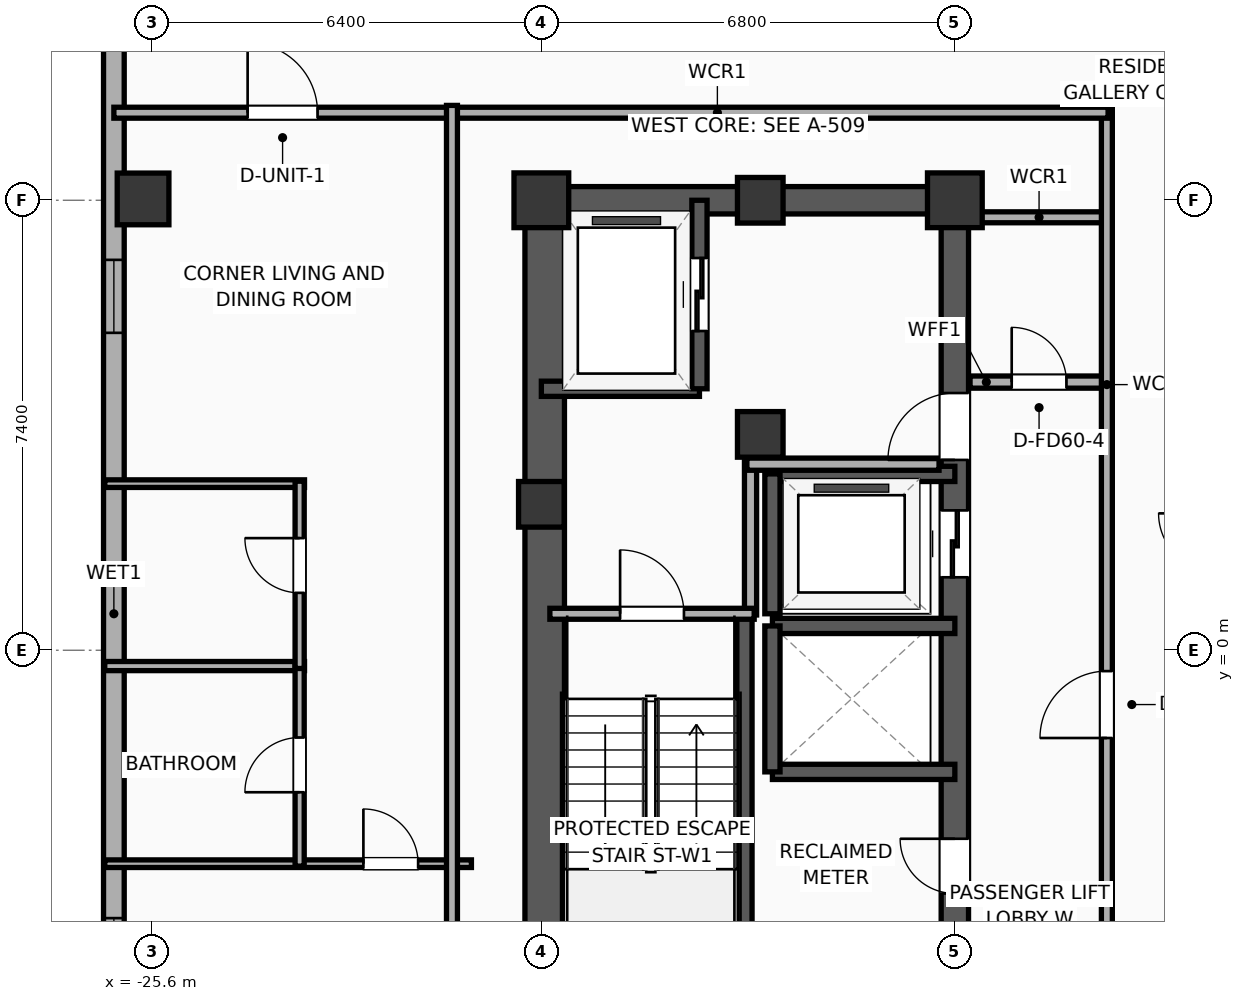
"""IFC4 building model, lengths in metres.
Left out: names, types, materials, properties, quantities, classifications, styles, units other than length and angle.
Written with IfcOpenShell. Run it as: python <this file> out.ifc"""

import sys

from ifc_helpers import new_model, si_unit, direction, frame, frame_2d, origin, origin_2d, place, context, subcontext, project, spatial, rectangle, hollow_rectangle, extrude, element, fill, save


model = new_model("IFC4")
c1 = context("Model", 3, precision=1e-05, world=origin(), true_north=direction((0.0, 1.0)))
c2 = subcontext(c1, "Body", "Model", "MODEL_VIEW")
j1 = project(units=[si_unit("LENGTHUNIT", "METRE"), si_unit("PLANEANGLEUNIT", "RADIAN")], contexts=[c1])
p1 = place(None, origin())
s1 = spatial("IfcSite", under=j1, at=p1, CompositionType="ELEMENT")
p2 = place(p1, origin())
s2 = spatial("IfcBuilding", under=s1, at=p2, CompositionType="ELEMENT")
p3 = place(p2, frame((0.0, 0.0, 204.1)))
s3 = spatial("IfcBuildingStorey", under=s2, at=p3, CompositionType="ELEMENT", Elevation=204.1)
p4 = place(p3, frame((-19.2, 2.4, 0.0), z_axis=(0.0, 0.0, 1.0), x_axis=(1.0, 0.0, 0.0)))
e1 = element("IfcColumn", 1, at=p4, inside=s3, PredefinedType="COLUMN", context=c2, shape_type="SweptSolid", body=[
    extrude(rectangle(XDim=0.75, YDim=0.75, at=origin_2d()), origin(), (0.0, 0.0, 1.0), 3.9),
])
p5 = place(p3, frame((-19.2, 7.4, 0.0), z_axis=(0.0, 0.0, 1.0), x_axis=(1.0, 0.0, 0.0)))
e2 = element("IfcColumn", 2, at=p5, inside=s3, PredefinedType="COLUMN", context=c2, shape_type="SweptSolid", body=[
    extrude(rectangle(XDim=0.9, YDim=0.9, at=origin_2d()), origin(), (0.0, 0.0, 1.0), 3.9),
])
for number, where, z_axis, x_axis in (
    (3, (-15.6, 7.4, 0.0), (0.0, 0.0, 1.0), (1.0, 0.0, 0.0)),
    (4, (-15.6, 3.55, 0.0), (0.0, 0.0, 1.0), (1.0, 0.0, 0.0)),
):
    element("IfcColumn", number, at=place(p3, frame(where, z_axis=z_axis, x_axis=x_axis)), inside=s3, PredefinedType="COLUMN", context=c2, shape_type="SweptSolid", body=[
        extrude(rectangle(XDim=0.75, YDim=0.75, at=origin_2d()), origin(), (0.0, 0.0, 1.0), 3.9),
    ])
p6 = place(p3, frame((-12.4, 7.4, 0.0), z_axis=(0.0, 0.0, 1.0), x_axis=(1.0, 0.0, 0.0)))
e5 = element("IfcColumn", 5, at=p6, inside=s3, PredefinedType="COLUMN", context=c2, shape_type="SweptSolid", body=[
    extrude(rectangle(XDim=0.9, YDim=0.9, at=origin_2d()), origin(), (0.0, 0.0, 1.0), 3.9),
])
p7 = place(p3, frame((-19.425, 7.4, 0.0), z_axis=(0.0, 0.0, 1.0), x_axis=(1.0, 0.0, 0.0)))
e6 = element("IfcWall", 6, at=p7, inside=s3, PredefinedType="SHEAR", context=c2, shape_type="SweptSolid", body=[
    extrude(rectangle(XDim=7.25, YDim=0.45, at=frame_2d((3.625, 0.0))), origin(), (0.0, 0.0, 1.0), 3.65),
])
p8 = place(p3, frame((-19.145, -7.4, 0.0), z_axis=(0.0, 0.0, 1.0), x_axis=(0.0, 1.0, 0.0)))
e7 = element("IfcWall", 7, at=p8, inside=s3, PredefinedType="SHEAR", context=c2, shape_type="SweptSolid", body=[
    extrude(rectangle(XDim=14.8, YDim=0.65, at=frame_2d((7.4, 0.0))), origin(), (0.0, 0.0, 1.0), 3.65),
])
p9 = place(p3, frame((-12.4, -7.4, 0.0), z_axis=(0.0, 0.0, 1.0), x_axis=(0.0, 1.0, 0.0)))
e8 = element("IfcWall", 8, at=p9, inside=s3, PredefinedType="SHEAR", context=c2, shape_type="SweptSolid", body=[
    extrude(rectangle(XDim=14.8, YDim=0.45, at=frame_2d((7.4, 0.0))), origin(), (0.0, 0.0, 1.0), 3.65),
])
p10 = place(p9, frame((8.6, 0.0, 0.0)))
e9 = element("IfcOpeningElement", 9, at=p10, cuts=e8, PredefinedType="OPENING", context=c2, shape_type="SweptSolid", body=[
    extrude(rectangle(XDim=1.1, YDim=2.05, at=frame_2d((0.55, 1.025))), frame((0.0, 0.235, 0.0), z_axis=(0.0, -1.0, 0.0), x_axis=(1.0, 0.0, 0.0)), (0.0, 0.0, 1.0), 0.47),
])
p11 = place(p9, frame((10.53, 0.0, 0.0)))
e10 = element("IfcOpeningElement", 10, at=p11, cuts=e8, PredefinedType="OPENING", context=c2, shape_type="SweptSolid", body=[
    extrude(rectangle(XDim=1.1, YDim=2.05, at=frame_2d((0.55, 1.025))), frame((0.0, 0.235, 0.0), z_axis=(0.0, -1.0, 0.0), x_axis=(1.0, 0.0, 0.0)), (0.0, 0.0, 1.0), 0.47),
])
p12 = place(p9, frame((0.85, 0.0, 0.0)))
e11 = element("IfcOpeningElement", 11, at=p12, cuts=e8, PredefinedType="OPENING", context=c2, shape_type="SweptSolid", body=[
    extrude(rectangle(XDim=0.9, YDim=2.05, at=frame_2d((0.45, 1.025))), frame((0.0, 0.235, 0.0), z_axis=(0.0, -1.0, 0.0), x_axis=(1.0, 0.0, 0.0)), (0.0, 0.0, 1.0), 0.47),
])
p13 = place(p9, frame((3.4, 0.0, 0.0)))
e12 = element("IfcOpeningElement", 12, at=p13, cuts=e8, PredefinedType="OPENING", context=c2, shape_type="SweptSolid", body=[
    extrude(rectangle(XDim=0.9, YDim=2.05, at=frame_2d((0.45, 1.025))), frame((0.0, 0.235, 0.0), z_axis=(0.0, -1.0, 0.0), x_axis=(1.0, 0.0, 0.0)), (0.0, 0.0, 1.0), 0.47),
])
p14 = place(p3, frame((-15.86, -7.085, 0.0), z_axis=(0.0, 0.0, 1.0), x_axis=(0.0, 1.0, 0.0)))
e13 = element("IfcWall", 13, at=p14, inside=s3, PredefinedType="SOLIDWALL", context=c2, shape_type="SweptSolid", body=[
    extrude(rectangle(XDim=7.685, YDim=0.25, at=frame_2d((3.843, 0.0))), origin(), (0.0, 0.0, 1.0), 3.65),
])
p15 = place(p3, frame((-25.75, 7.422, 0.0), z_axis=(0.0, 0.0, 1.0), x_axis=(1.0, 0.0, 0.0)))
e14 = element("IfcColumn", 14, at=p15, inside=s3, PredefinedType="COLUMN", context=c2, shape_type="SweptSolid", body=[
    extrude(hollow_rectangle(XDim=0.85, YDim=0.85, WallThickness=0.028, at=origin_2d()), origin(), (0.0, 0.0, 1.0), 3.9),
])
p16 = place(p3, frame((-26.23, -15.383, 0.0), z_axis=(0.0, 0.0, 1.0), x_axis=(0.0, 1.0, 0.0)))
e15 = element("IfcWall", 15, at=p16, inside=s3, PredefinedType="ELEMENTEDWALL", context=c2, shape_type="SweptSolid", body=[
    extrude(rectangle(XDim=31.967, YDim=0.34, at=frame_2d((15.983, 0.0))), origin(), (0.0, 0.0, 1.0), 3.65),
])
p17 = place(p16, frame((29.431, 0.0, 0.75)))
e16 = element("IfcOpeningElement", 16, at=p17, cuts=e15, PredefinedType="OPENING", context=c2, shape_type="SweptSolid", body=[
    extrude(rectangle(XDim=1.2, YDim=2.05, at=frame_2d((0.6, 1.025))), frame((0.0, 0.18, 0.0), z_axis=(0.0, -1.0, 0.0), x_axis=(1.0, 0.0, 0.0)), (0.0, 0.0, 1.0), 0.36),
])
p18 = place(p16, frame((20.603, 0.0, 0.75)))
e17 = element("IfcOpeningElement", 17, at=p18, cuts=e15, PredefinedType="OPENING", context=c2, shape_type="SweptSolid", body=[
    extrude(rectangle(XDim=1.2, YDim=2.05, at=frame_2d((0.6, 1.025))), frame((0.0, 0.18, 0.0), z_axis=(0.0, -1.0, 0.0), x_axis=(1.0, 0.0, 0.0)), (0.0, 0.0, 1.0), 0.36),
])
p19 = place(p16, frame((9.778, 0.0, 0.75)))
e18 = element("IfcOpeningElement", 18, at=p19, cuts=e15, PredefinedType="OPENING", context=c2, shape_type="SweptSolid", body=[
    extrude(rectangle(XDim=1.2, YDim=2.05, at=frame_2d((0.6, 1.025))), frame((0.0, 0.18, 0.0), z_axis=(0.0, -1.0, 0.0), x_axis=(1.0, 0.0, 0.0)), (0.0, 0.0, 1.0), 0.36),
])
p20 = place(p3, frame((-19.2, 4.3, 0.0), z_axis=(0.0, 0.0, 1.0), x_axis=(1.0, 0.0, 0.0)))
e19 = element("IfcWall", 19, at=p20, inside=s3, PredefinedType="SOLIDWALL", context=c2, shape_type="SweptSolid", body=[
    extrude(rectangle(XDim=2.6, YDim=0.25, at=frame_2d((1.3, 0.0))), origin(), (0.0, 0.0, 1.0), 3.65),
])
p21 = place(p3, frame((-16.6, 4.3, 0.0), z_axis=(0.0, 0.0, 1.0), x_axis=(0.0, 1.0, 0.0)))
e20 = element("IfcWall", 20, at=p21, inside=s3, PredefinedType="SOLIDWALL", context=c2, shape_type="SweptSolid", body=[
    extrude(rectangle(XDim=3.1, YDim=0.25, at=frame_2d((1.55, 0.0))), origin(), (0.0, 0.0, 1.0), 3.65),
])
p22 = place(p21, frame((0.95, 0.0, 0.0)))
e21 = element("IfcOpeningElement", 21, at=p22, cuts=e20, PredefinedType="OPENING", context=c2, shape_type="SweptSolid", body=[
    extrude(rectangle(XDim=1.2, YDim=2.05, at=frame_2d((0.6, 1.025))), frame((0.0, 0.135, 0.0), z_axis=(0.0, -1.0, 0.0), x_axis=(1.0, 0.0, 0.0)), (0.0, 0.0, 1.0), 0.27),
])
for number, where, z_axis, x_axis in (
    (22, (-15.4, -2.0, 0.0), (0.0, 0.0, 1.0), (1.0, 0.0, 0.0)),
    (23, (-12.4, 0.4, 0.0), (0.0, 0.0, 1.0), (-1.0, 0.0, 0.0)),
):
    element("IfcWall", number, at=place(p3, frame(where, z_axis=z_axis, x_axis=x_axis)), inside=s3, PredefinedType="SOLIDWALL", context=c2, shape_type="SweptSolid", body=[
        extrude(rectangle(XDim=3.0, YDim=0.25, at=frame_2d((1.5, 0.0))), origin(), (0.0, 0.0, 1.0), 3.65),
    ])
p23 = place(p3, frame((-15.4, 0.4, 0.0), z_axis=(0.0, 0.0, 1.0), x_axis=(0.0, -1.0, 0.0)))
e24 = element("IfcWall", 24, at=p23, inside=s3, PredefinedType="SOLIDWALL", context=c2, shape_type="SweptSolid", body=[
    extrude(rectangle(XDim=2.4, YDim=0.25, at=frame_2d((1.2, 0.0))), origin(), (0.0, 0.0, 1.0), 3.65),
])
p24 = place(p3, frame((-12.4, 2.9, 0.0), z_axis=(0.0, 0.0, 1.0), x_axis=(-1.0, 0.0, 0.0)))
e25 = element("IfcWall", 25, at=p24, inside=s3, PredefinedType="SOLIDWALL", context=c2, shape_type="SweptSolid", body=[
    extrude(rectangle(XDim=3.0, YDim=0.25, at=frame_2d((1.5, 0.0))), origin(), (0.0, 0.0, 1.0), 3.65),
])
p25 = place(p3, frame((-15.4, 2.9, 0.0), z_axis=(0.0, 0.0, 1.0), x_axis=(0.0, -1.0, 0.0)))
e26 = element("IfcWall", 26, at=p25, inside=s3, PredefinedType="SOLIDWALL", context=c2, shape_type="SweptSolid", body=[
    extrude(rectangle(XDim=2.3, YDim=0.25, at=frame_2d((1.15, 0.0))), origin(), (0.0, 0.0, 1.0), 3.65),
])
p26 = place(p3, frame((-15.76, 0.58, 0.0), z_axis=(0.0, 0.0, 1.0), x_axis=(0.0, 1.0, 0.0)))
e27 = element("IfcWall", 27, at=p26, inside=s3, PredefinedType="PARTITIONING", context=c2, shape_type="SweptSolid", body=[
    extrude(rectangle(XDim=2.52, YDim=0.2, at=frame_2d((1.26, 0.0))), origin(), (0.0, 0.0, 1.0), 3.65),
])
p27 = place(p3, frame((-15.82, 3.06, 0.0), z_axis=(0.0, 0.0, 1.0), x_axis=(1.0, 0.0, 0.0)))
e28 = element("IfcWall", 28, at=p27, inside=s3, PredefinedType="PARTITIONING", context=c2, shape_type="SweptSolid", body=[
    extrude(rectangle(XDim=3.16, YDim=0.2, at=frame_2d((1.58, 0.0))), origin(), (0.0, 0.0, 1.0), 3.65),
])
p28 = place(p3, frame((-19.06, 0.6, 0.0), z_axis=(0.0, 0.0, 1.0), x_axis=(1.0, 0.0, 0.0)))
e29 = element("IfcWall", 29, at=p28, inside=s3, PredefinedType="PARTITIONING", context=c2, shape_type="SweptSolid", body=[
    extrude(rectangle(XDim=3.36, YDim=0.18, at=frame_2d((1.68, 0.0))), origin(), (0.0, 0.0, 1.0), 3.65),
])
p29 = place(p28, frame((1.155, 0.0, 0.0)))
e30 = element("IfcOpeningElement", 30, at=p29, cuts=e29, PredefinedType="OPENING", context=c2, shape_type="SweptSolid", body=[
    extrude(rectangle(XDim=1.05, YDim=2.05, at=frame_2d((0.525, 1.025))), frame((0.0, 0.1, 0.0), z_axis=(0.0, -1.0, 0.0), x_axis=(1.0, 0.0, 0.0)), (0.0, 0.0, 1.0), 0.2),
])
p30 = place(p3, frame((-12.15, 4.41, 0.0), z_axis=(0.0, 0.0, 1.0), x_axis=(1.0, 0.0, 0.0)))
e31 = element("IfcWall", 31, at=p30, inside=s3, PredefinedType="PARTITIONING", context=c2, shape_type="SweptSolid", body=[
    extrude(rectangle(XDim=2.27, YDim=0.2, at=frame_2d((1.135, 0.0))), origin(), (0.0, 0.0, 1.0), 3.65),
])
p31 = place(p30, frame((0.685, 0.0, 0.0)))
e32 = element("IfcOpeningElement", 32, at=p31, cuts=e31, PredefinedType="OPENING", context=c2, shape_type="SweptSolid", body=[
    extrude(rectangle(XDim=0.9, YDim=2.05, at=frame_2d((0.45, 1.025))), frame((0.0, 0.11, 0.0), z_axis=(0.0, -1.0, 0.0), x_axis=(1.0, 0.0, 0.0)), (0.0, 0.0, 1.0), 0.22),
])
p32 = place(p3, frame((-12.15, 7.12, 0.0), z_axis=(0.0, 0.0, 1.0), x_axis=(1.0, 0.0, 0.0)))
e33 = element("IfcWall", 33, at=p32, inside=s3, PredefinedType="PARTITIONING", context=c2, shape_type="SweptSolid", body=[
    extrude(rectangle(XDim=2.27, YDim=0.18, at=frame_2d((1.135, 0.0))), origin(), (0.0, 0.0, 1.0), 3.65),
])
p33 = place(p3, frame((-9.9, -8.93, 0.0), z_axis=(0.0, 0.0, 1.0), x_axis=(0.0, 1.0, 0.0)))
e34 = element("IfcWall", 34, at=p33, inside=s3, PredefinedType="PARTITIONING", context=c2, shape_type="SweptSolid", body=[
    extrude(rectangle(XDim=17.86, YDim=0.18, at=frame_2d((8.93, 0.0))), origin(), (0.0, 0.0, 1.0), 3.65),
])
p34 = place(p33, frame((7.487, 0.0, 0.0)))
e35 = element("IfcOpeningElement", 35, at=p34, cuts=e34, PredefinedType="OPENING", context=c2, shape_type="SweptSolid", body=[
    extrude(rectangle(XDim=1.1, YDim=2.05, at=frame_2d((0.55, 1.025))), frame((0.0, 0.1, 0.0), z_axis=(0.0, -1.0, 0.0), x_axis=(1.0, 0.0, 0.0)), (0.0, 0.0, 1.0), 0.2),
])
p35 = place(p3, frame((-26.23, 8.84, 0.0), z_axis=(0.0, 0.0, 1.0), x_axis=(1.0, 0.0, 0.0)))
e36 = element("IfcWall", 36, at=p35, inside=s3, PredefinedType="PARTITIONING", context=c2, shape_type="SweptSolid", body=[
    extrude(rectangle(XDim=16.35, YDim=0.18, at=frame_2d((8.175, 0.0))), origin(), (0.0, 0.0, 1.0), 3.65),
])
p36 = place(p35, frame((2.2, 0.0, 0.0)))
e37 = element("IfcOpeningElement", 37, at=p36, cuts=e36, PredefinedType="OPENING", context=c2, shape_type="SweptSolid", body=[
    extrude(rectangle(XDim=1.15, YDim=2.05, at=frame_2d((0.575, 1.025))), frame((0.0, 0.1, 0.0), z_axis=(0.0, -1.0, 0.0), x_axis=(1.0, 0.0, 0.0)), (0.0, 0.0, 1.0), 0.2),
])
p37 = place(p3, frame((-26.38, 2.74, 0.0), z_axis=(0.0, 0.0, 1.0), x_axis=(1.0, 0.0, 0.0)))
e38 = element("IfcWall", 38, at=p37, inside=s3, PredefinedType="PARTITIONING", context=c2, shape_type="SweptSolid", body=[
    extrude(rectangle(XDim=3.285, YDim=0.125, at=frame_2d((1.643, 0.0))), origin(), (0.0, 0.0, 1.0), 3.65),
])
p38 = place(p3, frame((-26.38, -0.26, 0.0), z_axis=(0.0, 0.0, 1.0), x_axis=(1.0, 0.0, 0.0)))
e39 = element("IfcWall", 39, at=p38, inside=s3, PredefinedType="PLUMBINGWALL", context=c2, shape_type="SweptSolid", body=[
    extrude(rectangle(XDim=3.285, YDim=0.15, at=frame_2d((1.643, 0.0))), origin(), (0.0, 0.0, 1.0), 3.65),
])
p39 = place(p3, frame((-26.38, -3.51, 0.0), z_axis=(0.0, 0.0, 1.0), x_axis=(1.0, 0.0, 0.0)))
e40 = element("IfcWall", 40, at=p39, inside=s3, PredefinedType="PARTITIONING", context=c2, shape_type="SweptSolid", body=[
    extrude(rectangle(XDim=6.03, YDim=0.125, at=frame_2d((3.015, 0.0))), origin(), (0.0, 0.0, 1.0), 3.65),
])
p40 = place(p39, frame((4.253, 0.0, 0.0)))
e41 = element("IfcOpeningElement", 41, at=p40, cuts=e40, PredefinedType="OPENING", context=c2, shape_type="SweptSolid", body=[
    extrude(rectangle(XDim=0.9, YDim=2.05, at=frame_2d((0.45, 1.025))), frame((0.0, 0.073, 0.0), z_axis=(0.0, -1.0, 0.0), x_axis=(1.0, 0.0, 0.0)), (0.0, 0.0, 1.0), 0.145),
])
p41 = place(p3, frame((-23.175, -3.55, 0.0), z_axis=(0.0, 0.0, 1.0), x_axis=(0.0, 1.0, 0.0)))
e42 = element("IfcWall", 42, at=p41, inside=s3, PredefinedType="PLUMBINGWALL", context=c2, shape_type="SweptSolid", body=[
    extrude(rectangle(XDim=3.33, YDim=0.15, at=frame_2d((1.665, 0.0))), origin(), (0.0, 0.0, 1.0), 3.65),
])
p42 = place(p41, frame((1.215, 0.0, 0.0)))
e43 = element("IfcOpeningElement", 43, at=p42, cuts=e42, PredefinedType="OPENING", context=c2, shape_type="SweptSolid", body=[
    extrude(rectangle(XDim=0.9, YDim=2.05, at=frame_2d((0.45, 1.025))), frame((0.0, 0.085, 0.0), z_axis=(0.0, -1.0, 0.0), x_axis=(1.0, 0.0, 0.0)), (0.0, 0.0, 1.0), 0.17),
])
p43 = place(p3, frame((-23.175, -0.3, 0.0), z_axis=(0.0, 0.0, 1.0), x_axis=(0.0, 1.0, 0.0)))
e44 = element("IfcWall", 44, at=p43, inside=s3, PredefinedType="PLUMBINGWALL", context=c2, shape_type="SweptSolid", body=[
    extrude(rectangle(XDim=3.08, YDim=0.15, at=frame_2d((1.54, 0.0))), origin(), (0.0, 0.0, 1.0), 3.65),
])
p44 = place(p43, frame((1.244, 0.0, 0.0)))
e45 = element("IfcOpeningElement", 45, at=p44, cuts=e44, PredefinedType="OPENING", context=c2, shape_type="SweptSolid", body=[
    extrude(rectangle(XDim=0.9, YDim=2.05, at=frame_2d((0.45, 1.025))), frame((0.0, 0.085, 0.0), z_axis=(0.0, -1.0, 0.0), x_axis=(1.0, 0.0, 0.0)), (0.0, 0.0, 1.0), 0.17),
])
p45 = place(p3, frame((-20.67, -8.96, 0.0), z_axis=(0.0, 0.0, 1.0), x_axis=(0.0, 1.0, 0.0)))
e46 = element("IfcWall", 46, at=p45, inside=s3, PredefinedType="PARTITIONING", context=c2, shape_type="SweptSolid", body=[
    extrude(rectangle(XDim=17.92, YDim=0.18, at=frame_2d((8.96, 0.0))), origin(), (0.0, 0.0, 1.0), 3.65),
])
p46 = place(p18, origin())
e47 = element("IfcWindow", 47, at=p46, inside=s3, PartitioningType="SINGLE_PANEL", PredefinedType="WINDOW", context=c2, shape_type="SweptSolid", body=[
    extrude(rectangle(XDim=1.2, YDim=2.05, at=frame_2d((0.6, 1.025))), frame((0.0, 0.03, 0.0), z_axis=(0.0, -1.0, 0.0), x_axis=(1.0, 0.0, 0.0)), (0.0, 0.0, 1.0), 0.06),
])
fill(e17, e47)
p47 = place(p19, origin())
e48 = element("IfcWindow", 48, at=p47, inside=s3, PartitioningType="SINGLE_PANEL", PredefinedType="WINDOW", context=c2, shape_type="SweptSolid", body=[
    extrude(rectangle(XDim=1.2, YDim=2.05, at=frame_2d((0.6, 1.025))), frame((0.0, 0.03, 0.0), z_axis=(0.0, -1.0, 0.0), x_axis=(1.0, 0.0, 0.0)), (0.0, 0.0, 1.0), 0.06),
])
fill(e18, e48)
p48 = place(p22, origin())
e49 = element("IfcDoor", 49, at=p48, inside=s3, OperationType="SLIDING_TO_LEFT", PredefinedType="DOOR", context=c2, shape_type="SweptSolid", body=[
    extrude(rectangle(XDim=1.2, YDim=2.05, at=frame_2d((0.6, 1.025))), frame((0.0, 0.025, 0.0), z_axis=(0.0, -1.0, 0.0), x_axis=(1.0, 0.0, 0.0)), (0.0, 0.0, 1.0), 0.05),
])
fill(e21, e49)
p49 = place(p10, origin())
e50 = element("IfcDoor", 50, at=p49, inside=s3, OperationType="SLIDING_TO_LEFT", PredefinedType="DOOR", context=c2, shape_type="SweptSolid", body=[
    extrude(rectangle(XDim=1.1, YDim=2.05, at=frame_2d((0.55, 1.025))), frame((0.0, 0.025, 0.0), z_axis=(0.0, -1.0, 0.0), x_axis=(1.0, 0.0, 0.0)), (0.0, 0.0, 1.0), 0.05),
])
fill(e9, e50)
p50 = place(p29, origin())
e51 = element("IfcDoor", 51, at=p50, inside=s3, OperationType="SINGLE_SWING_LEFT", PredefinedType="DOOR", context=c2, shape_type="SweptSolid", body=[
    extrude(rectangle(XDim=1.05, YDim=2.05, at=frame_2d((0.525, 1.025))), frame((0.0, 0.025, 0.0), z_axis=(0.0, -1.0, 0.0), x_axis=(1.0, 0.0, 0.0)), (0.0, 0.0, 1.0), 0.05),
])
fill(e30, e51)
p51 = place(p31, origin())
e52 = element("IfcDoor", 52, at=p51, inside=s3, OperationType="SINGLE_SWING_LEFT", PredefinedType="DOOR", context=c2, shape_type="SweptSolid", body=[
    extrude(rectangle(XDim=0.9, YDim=2.05, at=frame_2d((0.45, 1.025))), frame((0.0, 0.025, 0.0), z_axis=(0.0, -1.0, 0.0), x_axis=(1.0, 0.0, 0.0)), (0.0, 0.0, 1.0), 0.05),
])
fill(e32, e52)
p52 = place(p34, origin())
e53 = element("IfcDoor", 53, at=p52, inside=s3, OperationType="SINGLE_SWING_LEFT", PredefinedType="DOOR", context=c2, shape_type="SweptSolid", body=[
    extrude(rectangle(XDim=1.1, YDim=2.05, at=frame_2d((0.55, 1.025))), frame((0.0, 0.025, 0.0), z_axis=(0.0, -1.0, 0.0), x_axis=(1.0, 0.0, 0.0)), (0.0, 0.0, 1.0), 0.05),
])
fill(e35, e53)
p53 = place(p36, origin())
e54 = element("IfcDoor", 54, at=p53, inside=s3, OperationType="SINGLE_SWING_LEFT", PredefinedType="DOOR", context=c2, shape_type="SweptSolid", body=[
    extrude(rectangle(XDim=1.15, YDim=2.05, at=frame_2d((0.575, 1.025))), frame((0.0, 0.025, 0.0), z_axis=(0.0, -1.0, 0.0), x_axis=(1.0, 0.0, 0.0)), (0.0, 0.0, 1.0), 0.05),
])
fill(e37, e54)
p54 = place(p40, origin())
e55 = element("IfcDoor", 55, at=p54, inside=s3, OperationType="SINGLE_SWING_LEFT", PredefinedType="DOOR", context=c2, shape_type="SweptSolid", body=[
    extrude(rectangle(XDim=0.9, YDim=2.05, at=frame_2d((0.45, 1.025))), frame((0.0, 0.025, 0.0), z_axis=(0.0, -1.0, 0.0), x_axis=(1.0, 0.0, 0.0)), (0.0, 0.0, 1.0), 0.05),
])
fill(e41, e55)
p55 = place(p42, origin())
e56 = element("IfcDoor", 56, at=p55, inside=s3, OperationType="SINGLE_SWING_LEFT", PredefinedType="DOOR", context=c2, shape_type="SweptSolid", body=[
    extrude(rectangle(XDim=0.9, YDim=2.05, at=frame_2d((0.45, 1.025))), frame((0.0, 0.025, 0.0), z_axis=(0.0, -1.0, 0.0), x_axis=(1.0, 0.0, 0.0)), (0.0, 0.0, 1.0), 0.05),
])
fill(e43, e56)
p56 = place(p44, origin())
e57 = element("IfcDoor", 57, at=p56, inside=s3, OperationType="SINGLE_SWING_RIGHT", PredefinedType="DOOR", context=c2, shape_type="SweptSolid", body=[
    extrude(rectangle(XDim=0.9, YDim=2.05, at=frame_2d((0.45, 1.025))), frame((0.0, 0.025, 0.0), z_axis=(0.0, -1.0, 0.0), x_axis=(1.0, 0.0, 0.0)), (0.0, 0.0, 1.0), 0.05),
])
fill(e45, e57)
p57 = place(p11, origin())
e58 = element("IfcDoor", 58, at=p57, inside=s3, OperationType="SINGLE_SWING_LEFT", PredefinedType="DOOR", context=c2, shape_type="SweptSolid", body=[
    extrude(rectangle(XDim=1.1, YDim=2.05, at=frame_2d((0.55, 1.025))), frame((0.0, 0.025, 0.0), z_axis=(0.0, -1.0, 0.0), x_axis=(1.0, 0.0, 0.0)), (0.0, 0.0, 1.0), 0.05),
])
fill(e10, e58)
p58 = place(p13, origin())
e59 = element("IfcDoor", 59, at=p58, inside=s3, OperationType="SINGLE_SWING_RIGHT", PredefinedType="DOOR", context=c2, shape_type="SweptSolid", body=[
    extrude(rectangle(XDim=0.9, YDim=2.05, at=frame_2d((0.45, 1.025))), frame((0.0, 0.025, 0.0), z_axis=(0.0, -1.0, 0.0), x_axis=(1.0, 0.0, 0.0)), (0.0, 0.0, 1.0), 0.05),
])
fill(e12, e59)
save(model, sys.argv[1])
